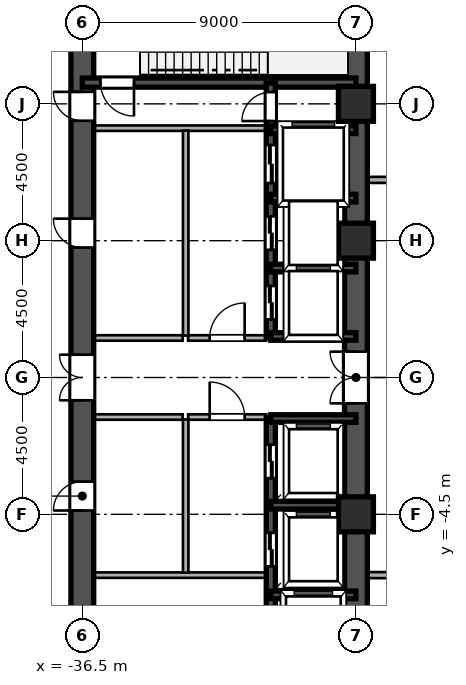
"""IFC4 building model, lengths in metres.
Left out: names, types, materials, properties, quantities, classifications, styles, units other than length and angle.
Written with IfcOpenShell. Run it as: python <this file> out.ifc"""

import sys

from ifc_helpers import new_model, si_unit, direction, frame, frame_2d, origin, origin_2d, place, context, subcontext, project, spatial, rectangle, hollow_rectangle, extrude, source, transform, mapped, element, fill, save


model = new_model("IFC4")
c1 = context("Model", 3, precision=1e-05, world=origin(), true_north=direction((0.0, 1.0)))
c2 = subcontext(c1, "Body", "Model", "MODEL_VIEW")
j1 = project(units=[si_unit("LENGTHUNIT", "METRE"), si_unit("PLANEANGLEUNIT", "RADIAN")], contexts=[c1])
p1 = place(None, origin())
s1 = spatial("IfcSite", under=j1, at=p1, CompositionType="ELEMENT")
p2 = place(p1, origin())
s2 = spatial("IfcBuilding", under=s1, at=p2, CompositionType="ELEMENT")
p3 = place(p2, origin())
s3 = spatial("IfcBuildingStorey", under=s2, at=p3, CompositionType="ELEMENT", Elevation=0.0)
m1 = source(origin(), c2, "Body", "SweptSolid", [
    extrude(hollow_rectangle(XDim=1.15, YDim=1.15, WallThickness=0.048, at=origin_2d()), origin(), (0.0, 0.0, 1.0), 5.4),
])
for number, where, z_axis, x_axis in (
    (1, (-27.5, -4.5, 0.0), (0.0, 0.0, 1.0), (1.0, 0.0, 0.0)),
    (2, (-27.5, 4.5, 0.0), (0.0, 0.0, 1.0), (1.0, 0.0, 0.0)),
    (3, (-27.5, 9.0, 0.0), (0.0, 0.0, 1.0), (1.0, 0.0, 0.0)),
):
    element("IfcColumn", number, at=place(p3, frame(where, z_axis=z_axis, x_axis=x_axis)), inside=s3, PredefinedType="COLUMN", context=c2, shape_type="MappedRepresentation", body=[
        mapped(m1, transform((0.0, 0.0, 0.0), scale=1.0)),
    ])
for number, where, z_axis, x_axis in (
    (4, (-27.5, -13.5, 0.0), (0.0, 0.0, 1.0), (0.0, 1.0, 0.0)),
    (5, (-27.5, 1.3, 0.0), (0.0, 0.0, 1.0), (0.0, 1.0, 0.0)),
):
    element("IfcWall", number, at=place(p3, frame(where, z_axis=z_axis, x_axis=x_axis)), inside=s3, PredefinedType="SHEAR", context=c2, shape_type="SweptSolid", body=[
        extrude(rectangle(XDim=12.2, YDim=0.75, at=frame_2d((6.1, 0.0))), origin(), (0.0, 0.0, 1.0), 5.12),
    ])
p4 = place(p3, frame((-27.5, -1.3, 0.0), z_axis=(0.0, 0.0, 1.0), x_axis=(0.0, 1.0, 0.0)))
e6 = element("IfcWall", 6, at=p4, inside=s3, PredefinedType="SHEAR", context=c2, shape_type="SweptSolid", body=[
    extrude(rectangle(XDim=2.6, YDim=0.75, at=frame_2d((1.3, 0.0))), origin(), (0.0, 0.0, 1.0), 5.12),
])
p5 = place(p4, frame((0.45, 0.0, 0.0)))
e7 = element("IfcOpeningElement", 7, at=p5, cuts=e6, PredefinedType="OPENING", context=c2, shape_type="SweptSolid", body=[
    extrude(rectangle(XDim=1.7, YDim=2.35, at=frame_2d((0.85, 1.175))), frame((0.0, 0.385, 0.0), z_axis=(0.0, -1.0, 0.0), x_axis=(1.0, 0.0, 0.0)), (0.0, 0.0, 1.0), 0.77),
])
p6 = place(p3, frame((-36.5, -13.65, 0.0), z_axis=(0.0, 0.0, 1.0), x_axis=(0.0, 1.0, 0.0)))
e8 = element("IfcWall", 8, at=p6, inside=s3, PredefinedType="SHEAR", context=c2, shape_type="SweptSolid", body=[
    extrude(rectangle(XDim=7.15, YDim=0.75, at=frame_2d((3.575, 0.0))), origin(), (0.0, 0.0, 1.0), 5.12),
])
p7 = place(p6, frame((4.675, 0.0, 0.0)))
e9 = element("IfcOpeningElement", 9, at=p7, cuts=e8, PredefinedType="OPENING", context=c2, shape_type="SweptSolid", body=[
    extrude(rectangle(XDim=1.15, YDim=2.2, at=frame_2d((0.575, 1.1))), frame((0.0, 0.385, 0.0), z_axis=(0.0, -1.0, 0.0), x_axis=(1.0, 0.0, 0.0)), (0.0, 0.0, 1.0), 0.77),
])
p8 = place(p3, frame((-36.5, -1.3, 0.0), z_axis=(0.0, 0.0, 1.0), x_axis=(0.0, 1.0, 0.0)))
e10 = element("IfcWall", 10, at=p8, inside=s3, PredefinedType="SHEAR", context=c2, shape_type="SweptSolid", body=[
    extrude(rectangle(XDim=2.6, YDim=0.75, at=frame_2d((1.3, 0.0))), origin(), (0.0, 0.0, 1.0), 5.12),
])
p9 = place(p8, frame((0.55, 0.0, 0.0)))
e11 = element("IfcOpeningElement", 11, at=p9, cuts=e10, PredefinedType="OPENING", context=c2, shape_type="SweptSolid", body=[
    extrude(rectangle(XDim=1.5, YDim=2.3, at=frame_2d((0.75, 1.15))), frame((0.0, 0.385, 0.0), z_axis=(0.0, -1.0, 0.0), x_axis=(1.0, 0.0, 0.0)), (0.0, 0.0, 1.0), 0.77),
])
p10 = place(p3, frame((-36.5, 8.2, 0.0), z_axis=(0.0, 0.0, 1.0), x_axis=(0.0, 1.0, 0.0)))
e12 = element("IfcWall", 12, at=p10, inside=s3, PredefinedType="SHEAR", context=c2, shape_type="SweptSolid", body=[
    extrude(rectangle(XDim=5.45, YDim=0.75, at=frame_2d((2.725, 0.0))), origin(), (0.0, 0.0, 1.0), 5.12),
])
p11 = place(p10, frame((0.245, 0.0, 0.0)))
e13 = element("IfcOpeningElement", 13, at=p11, cuts=e12, PredefinedType="OPENING", context=c2, shape_type="SweptSolid", body=[
    extrude(rectangle(XDim=0.95, YDim=2.15, at=frame_2d((0.475, 1.075))), frame((0.0, 0.385, 0.0), z_axis=(0.0, -1.0, 0.0), x_axis=(1.0, 0.0, 0.0)), (0.0, 0.0, 1.0), 0.77),
])
p12 = place(p3, frame((-36.5, -6.5, 0.0), z_axis=(0.0, 0.0, 1.0), x_axis=(0.0, 1.0, 0.0)))
e14 = element("IfcWall", 14, at=p12, inside=s3, PredefinedType="SHEAR", context=c2, shape_type="SweptSolid", body=[
    extrude(rectangle(XDim=5.2, YDim=0.75, at=frame_2d((2.6, 0.0))), origin(), (0.0, 0.0, 1.0), 5.12),
])
p13 = place(p12, frame((2.125, 0.0, 0.0)))
e15 = element("IfcOpeningElement", 15, at=p13, cuts=e14, PredefinedType="OPENING", context=c2, shape_type="SweptSolid", body=[
    extrude(rectangle(XDim=0.95, YDim=2.15, at=frame_2d((0.475, 1.075))), frame((0.0, 0.385, 0.0), z_axis=(0.0, -1.0, 0.0), x_axis=(1.0, 0.0, 0.0)), (0.0, 0.0, 1.0), 0.77),
])
p14 = place(p3, frame((-36.5, 1.3, 0.0), z_axis=(0.0, 0.0, 1.0), x_axis=(0.0, 1.0, 0.0)))
e16 = element("IfcWall", 16, at=p14, inside=s3, PredefinedType="SHEAR", context=c2, shape_type="SweptSolid", body=[
    extrude(rectangle(XDim=6.9, YDim=0.75, at=frame_2d((3.45, 0.0))), origin(), (0.0, 0.0, 1.0), 5.12),
])
p15 = place(p14, frame((2.975, 0.0, 0.0)))
e17 = element("IfcOpeningElement", 17, at=p15, cuts=e16, PredefinedType="OPENING", context=c2, shape_type="SweptSolid", body=[
    extrude(rectangle(XDim=0.95, YDim=2.15, at=frame_2d((0.475, 1.075))), frame((0.0, 0.385, 0.0), z_axis=(0.0, -1.0, 0.0), x_axis=(1.0, 0.0, 0.0)), (0.0, 0.0, 1.0), 0.77),
])
p16 = place(p3, frame((-36.5, 9.7, 0.0), z_axis=(0.0, 0.0, 1.0), x_axis=(1.0, 0.0, 0.0)))
e18 = element("IfcWall", 18, at=p16, inside=s3, PredefinedType="SHEAR", context=c2, shape_type="SweptSolid", body=[
    extrude(rectangle(XDim=9.0, YDim=0.3, at=frame_2d((4.5, 0.0))), origin(), (0.0, 0.0, 1.0), 5.12),
])
p17 = place(p16, frame((0.6, 0.0, 0.0)))
e19 = element("IfcOpeningElement", 19, at=p17, cuts=e18, PredefinedType="OPENING", context=c2, shape_type="SweptSolid", body=[
    extrude(rectangle(XDim=1.1, YDim=2.2, at=frame_2d((0.55, 1.1))), frame((0.0, 0.16, 0.0), z_axis=(0.0, -1.0, 0.0), x_axis=(1.0, 0.0, 0.0)), (0.0, 0.0, 1.0), 0.32),
])
for number, where, z_axis, x_axis in (
    (20, (-30.3, -7.15, 0.0), (0.0, 0.0, 1.0), (1.0, 0.0, 0.0)),
    (21, (-30.3, -4.2, 0.0), (0.0, 0.0, 1.0), (1.0, 0.0, 0.0)),
    (22, (-30.3, -1.35, 0.0), (0.0, 0.0, 1.0), (1.0, 0.0, 0.0)),
    (23, (-30.3, 1.35, 0.0), (0.0, 0.0, 1.0), (1.0, 0.0, 0.0)),
    (24, (-30.3, 3.6, 0.0), (0.0, 0.0, 1.0), (1.0, 0.0, 0.0)),
    (25, (-30.3, 5.9, 0.0), (0.0, 0.0, 1.0), (1.0, 0.0, 0.0)),
    (26, (-30.3, 8.15, 0.0), (0.0, 0.0, 1.0), (1.0, 0.0, 0.0)),
):
    element("IfcWall", number, at=place(p3, frame(where, z_axis=z_axis, x_axis=x_axis)), inside=s3, PredefinedType="SHEAR", context=c2, shape_type="SweptSolid", body=[
        extrude(rectangle(XDim=2.8, YDim=0.25, at=frame_2d((1.4, 0.0))), origin(), (0.0, 0.0, 1.0), 5.12),
    ])
p18 = place(p3, frame((-30.3, -9.68, 0.0), z_axis=(0.0, 0.0, 1.0), x_axis=(0.0, 1.0, 0.0)))
e27 = element("IfcWall", 27, at=p18, inside=s3, PredefinedType="SHEAR", context=c2, shape_type="SweptSolid", body=[
    extrude(rectangle(XDim=2.56, YDim=0.3, at=frame_2d((1.28, 0.0))), origin(), (0.0, 0.0, 1.0), 5.12),
])
p19 = place(p18, frame((0.68, 0.0, 0.0)))
e28 = element("IfcOpeningElement", 28, at=p19, cuts=e27, PredefinedType="OPENING", context=c2, shape_type="SweptSolid", body=[
    extrude(rectangle(XDim=1.2, YDim=2.25, at=frame_2d((0.6, 1.125))), frame((0.0, 0.16, 0.0), z_axis=(0.0, -1.0, 0.0), x_axis=(1.0, 0.0, 0.0)), (0.0, 0.0, 1.0), 0.32),
])
p20 = place(p3, frame((-30.3, -7.12, 0.0), z_axis=(0.0, 0.0, 1.0), x_axis=(0.0, 1.0, 0.0)))
e29 = element("IfcWall", 29, at=p20, inside=s3, PredefinedType="SHEAR", context=c2, shape_type="SweptSolid", body=[
    extrude(rectangle(XDim=2.92, YDim=0.3, at=frame_2d((1.46, 0.0))), origin(), (0.0, 0.0, 1.0), 5.12),
])
p21 = place(p20, frame((0.91, 0.0, 0.0)))
e30 = element("IfcOpeningElement", 30, at=p21, cuts=e29, PredefinedType="OPENING", context=c2, shape_type="SweptSolid", body=[
    extrude(rectangle(XDim=1.1, YDim=2.2, at=frame_2d((0.55, 1.1))), frame((0.0, 0.16, 0.0), z_axis=(0.0, -1.0, 0.0), x_axis=(1.0, 0.0, 0.0)), (0.0, 0.0, 1.0), 0.32),
])
p22 = place(p3, frame((-30.3, -4.2, 0.0), z_axis=(0.0, 0.0, 1.0), x_axis=(0.0, 1.0, 0.0)))
e31 = element("IfcWall", 31, at=p22, inside=s3, PredefinedType="SHEAR", context=c2, shape_type="SweptSolid", body=[
    extrude(rectangle(XDim=2.88, YDim=0.3, at=frame_2d((1.44, 0.0))), origin(), (0.0, 0.0, 1.0), 5.12),
])
p23 = place(p22, frame((0.89, 0.0, 0.0)))
e32 = element("IfcOpeningElement", 32, at=p23, cuts=e31, PredefinedType="OPENING", context=c2, shape_type="SweptSolid", body=[
    extrude(rectangle(XDim=1.1, YDim=2.2, at=frame_2d((0.55, 1.1))), frame((0.0, 0.16, 0.0), z_axis=(0.0, -1.0, 0.0), x_axis=(1.0, 0.0, 0.0)), (0.0, 0.0, 1.0), 0.32),
])
p24 = place(p3, frame((-30.3, 1.32, 0.0), z_axis=(0.0, 0.0, 1.0), x_axis=(0.0, 1.0, 0.0)))
e33 = element("IfcWall", 33, at=p24, inside=s3, PredefinedType="SHEAR", context=c2, shape_type="SweptSolid", body=[
    extrude(rectangle(XDim=2.28, YDim=0.3, at=frame_2d((1.14, 0.0))), origin(), (0.0, 0.0, 1.0), 5.12),
])
p25 = place(p24, frame((0.59, 0.0, 0.0)))
e34 = element("IfcOpeningElement", 34, at=p25, cuts=e33, PredefinedType="OPENING", context=c2, shape_type="SweptSolid", body=[
    extrude(rectangle(XDim=1.1, YDim=2.2, at=frame_2d((0.55, 1.1))), frame((0.0, 0.16, 0.0), z_axis=(0.0, -1.0, 0.0), x_axis=(1.0, 0.0, 0.0)), (0.0, 0.0, 1.0), 0.32),
])
p26 = place(p3, frame((-30.3, 3.6, 0.0), z_axis=(0.0, 0.0, 1.0), x_axis=(0.0, 1.0, 0.0)))
e35 = element("IfcWall", 35, at=p26, inside=s3, PredefinedType="SHEAR", context=c2, shape_type="SweptSolid", body=[
    extrude(rectangle(XDim=2.3, YDim=0.3, at=frame_2d((1.15, 0.0))), origin(), (0.0, 0.0, 1.0), 5.12),
])
p27 = place(p26, frame((0.6, 0.0, 0.0)))
e36 = element("IfcOpeningElement", 36, at=p27, cuts=e35, PredefinedType="OPENING", context=c2, shape_type="SweptSolid", body=[
    extrude(rectangle(XDim=1.1, YDim=2.2, at=frame_2d((0.55, 1.1))), frame((0.0, 0.16, 0.0), z_axis=(0.0, -1.0, 0.0), x_axis=(1.0, 0.0, 0.0)), (0.0, 0.0, 1.0), 0.32),
])
p28 = place(p3, frame((-30.3, 5.9, 0.0), z_axis=(0.0, 0.0, 1.0), x_axis=(0.0, 1.0, 0.0)))
e37 = element("IfcWall", 37, at=p28, inside=s3, PredefinedType="SHEAR", context=c2, shape_type="SweptSolid", body=[
    extrude(rectangle(XDim=2.25, YDim=0.3, at=frame_2d((1.125, 0.0))), origin(), (0.0, 0.0, 1.0), 5.12),
])
p29 = place(p28, frame((0.495, 0.0, 0.0)))
e38 = element("IfcOpeningElement", 38, at=p29, cuts=e37, PredefinedType="OPENING", context=c2, shape_type="SweptSolid", body=[
    extrude(rectangle(XDim=1.25, YDim=2.3, at=frame_2d((0.625, 1.15))), frame((0.0, 0.16, 0.0), z_axis=(0.0, -1.0, 0.0), x_axis=(1.0, 0.0, 0.0)), (0.0, 0.0, 1.0), 0.32),
])
p30 = place(p3, frame((-30.3, 8.15, 0.0), z_axis=(0.0, 0.0, 1.0), x_axis=(0.0, 1.0, 0.0)))
e39 = element("IfcWall", 39, at=p30, inside=s3, PredefinedType="SHEAR", context=c2, shape_type="SweptSolid", body=[
    extrude(rectangle(XDim=1.53, YDim=0.3, at=frame_2d((0.765, 0.0))), origin(), (0.0, 0.0, 1.0), 5.12),
])
p31 = place(p30, frame((0.285, 0.0, 0.0)))
e40 = element("IfcOpeningElement", 40, at=p31, cuts=e39, PredefinedType="OPENING", context=c2, shape_type="SweptSolid", body=[
    extrude(rectangle(XDim=0.95, YDim=2.15, at=frame_2d((0.475, 1.075))), frame((0.0, 0.16, 0.0), z_axis=(0.0, -1.0, 0.0), x_axis=(1.0, 0.0, 0.0)), (0.0, 0.0, 1.0), 0.32),
])
for number, where, z_axis, x_axis in (
    (41, (-36.15, -6.5, 0.0), (0.0, 0.0, 1.0), (1.0, 0.0, 0.0)),
    (42, (-36.15, 8.2, 0.0), (0.0, 0.0, 1.0), (1.0, 0.0, 0.0)),
):
    element("IfcWall", number, at=place(p3, frame(where, z_axis=z_axis, x_axis=x_axis)), inside=s3, PredefinedType="PARTITIONING", context=c2, shape_type="SweptSolid", body=[
        extrude(rectangle(XDim=5.7, YDim=0.18, at=frame_2d((2.85, 0.0))), origin(), (0.0, 0.0, 1.0), 5.12),
    ])
p32 = place(p3, frame((-33.1, -6.42, 0.0), z_axis=(0.0, 0.0, 1.0), x_axis=(0.0, 1.0, 0.0)))
e43 = element("IfcWall", 43, at=p32, inside=s3, PredefinedType="PARTITIONING", context=c2, shape_type="SweptSolid", body=[
    extrude(rectangle(XDim=5.04, YDim=0.18, at=frame_2d((2.52, 0.0))), origin(), (0.0, 0.0, 1.0), 5.12),
])
p33 = place(p3, frame((-33.1, 1.38, 0.0), z_axis=(0.0, 0.0, 1.0), x_axis=(0.0, 1.0, 0.0)))
e44 = element("IfcWall", 44, at=p33, inside=s3, PredefinedType="PARTITIONING", context=c2, shape_type="SweptSolid", body=[
    extrude(rectangle(XDim=6.74, YDim=0.18, at=frame_2d((3.37, 0.0))), origin(), (0.0, 0.0, 1.0), 5.12),
])
p34 = place(p3, frame((-33.02, -1.3, 0.0), z_axis=(0.0, 0.0, 1.0), x_axis=(1.0, 0.0, 0.0)))
e45 = element("IfcWall", 45, at=p34, inside=s3, PredefinedType="PARTITIONING", context=c2, shape_type="SweptSolid", body=[
    extrude(rectangle(XDim=2.57, YDim=0.18, at=frame_2d((1.285, 0.0))), origin(), (0.0, 0.0, 1.0), 5.12),
])
p35 = place(p34, frame((0.71, 0.0, 0.0)))
e46 = element("IfcOpeningElement", 46, at=p35, cuts=e45, PredefinedType="OPENING", context=c2, shape_type="SweptSolid", body=[
    extrude(rectangle(XDim=1.15, YDim=2.2, at=frame_2d((0.575, 1.1))), frame((0.0, 0.1, 0.0), z_axis=(0.0, -1.0, 0.0), x_axis=(1.0, 0.0, 0.0)), (0.0, 0.0, 1.0), 0.2),
])
p36 = place(p3, frame((-33.02, 1.3, 0.0), z_axis=(0.0, 0.0, 1.0), x_axis=(1.0, 0.0, 0.0)))
e47 = element("IfcWall", 47, at=p36, inside=s3, PredefinedType="PARTITIONING", context=c2, shape_type="SweptSolid", body=[
    extrude(rectangle(XDim=2.57, YDim=0.18, at=frame_2d((1.285, 0.0))), origin(), (0.0, 0.0, 1.0), 5.12),
])
p37 = place(p36, frame((0.71, 0.0, 0.0)))
e48 = element("IfcOpeningElement", 48, at=p37, cuts=e47, PredefinedType="OPENING", context=c2, shape_type="SweptSolid", body=[
    extrude(rectangle(XDim=1.15, YDim=2.2, at=frame_2d((0.575, 1.1))), frame((0.0, 0.1, 0.0), z_axis=(0.0, -1.0, 0.0), x_axis=(1.0, 0.0, 0.0)), (0.0, 0.0, 1.0), 0.2),
])
for number, where, z_axis, x_axis in (
    (49, (-36.15, -1.3, 0.0), (0.0, 0.0, 1.0), (1.0, 0.0, 0.0)),
    (50, (-36.15, 1.3, 0.0), (0.0, 0.0, 1.0), (1.0, 0.0, 0.0)),
):
    element("IfcWall", number, at=place(p3, frame(where, z_axis=z_axis, x_axis=x_axis)), inside=s3, PredefinedType="PARTITIONING", context=c2, shape_type="SweptSolid", body=[
        extrude(rectangle(XDim=2.95, YDim=0.18, at=frame_2d((1.475, 0.0))), origin(), (0.0, 0.0, 1.0), 5.12),
    ])
p38 = place(p3, frame((-27.12, -6.5, 0.0), z_axis=(0.0, 0.0, 1.0), x_axis=(1.0, 0.0, 0.0)))
e51 = element("IfcWall", 51, at=p38, inside=s3, PredefinedType="PARTITIONING", context=c2, shape_type="SweptSolid", body=[
    extrude(rectangle(XDim=54.24, YDim=0.2, at=frame_2d((27.12, 0.0))), origin(), (0.0, 0.0, 1.0), 5.12),
])
p39 = place(p38, frame((5.145, 0.0, 0.0)))
e52 = element("IfcOpeningElement", 52, at=p39, cuts=e51, PredefinedType="OPENING", context=c2, shape_type="SweptSolid", body=[
    extrude(rectangle(XDim=0.95, YDim=2.15, at=frame_2d((0.475, 1.075))), frame((0.0, 0.11, 0.0), z_axis=(0.0, -1.0, 0.0), x_axis=(1.0, 0.0, 0.0)), (0.0, 0.0, 1.0), 0.22),
])
p40 = place(p38, frame((37.645, 0.0, 0.0)))
e53 = element("IfcOpeningElement", 53, at=p40, cuts=e51, PredefinedType="OPENING", context=c2, shape_type="SweptSolid", body=[
    extrude(rectangle(XDim=0.95, YDim=2.15, at=frame_2d((0.475, 1.075))), frame((0.0, 0.11, 0.0), z_axis=(0.0, -1.0, 0.0), x_axis=(1.0, 0.0, 0.0)), (0.0, 0.0, 1.0), 0.22),
])
p41 = place(p3, frame((-27.12, 6.5, 0.0), z_axis=(0.0, 0.0, 1.0), x_axis=(1.0, 0.0, 0.0)))
e54 = element("IfcWall", 54, at=p41, inside=s3, PredefinedType="PARTITIONING", context=c2, shape_type="SweptSolid", body=[
    extrude(rectangle(XDim=54.24, YDim=0.2, at=frame_2d((27.12, 0.0))), origin(), (0.0, 0.0, 1.0), 5.12),
])
p42 = place(p41, frame((4.045, 0.0, 0.0)))
e55 = element("IfcOpeningElement", 55, at=p42, cuts=e54, PredefinedType="OPENING", context=c2, shape_type="SweptSolid", body=[
    extrude(rectangle(XDim=1.15, YDim=2.2, at=frame_2d((0.575, 1.1))), frame((0.0, 0.11, 0.0), z_axis=(0.0, -1.0, 0.0), x_axis=(1.0, 0.0, 0.0)), (0.0, 0.0, 1.0), 0.22),
])
p43 = place(p41, frame((17.395, 0.0, 0.0)))
e56 = element("IfcOpeningElement", 56, at=p43, cuts=e54, PredefinedType="OPENING", context=c2, shape_type="SweptSolid", body=[
    extrude(rectangle(XDim=0.95, YDim=2.15, at=frame_2d((0.475, 1.075))), frame((0.0, 0.11, 0.0), z_axis=(0.0, -1.0, 0.0), x_axis=(1.0, 0.0, 0.0)), (0.0, 0.0, 1.0), 0.22),
])
p44 = place(p41, frame((47.33, 0.0, 0.0)))
e57 = element("IfcOpeningElement", 57, at=p44, cuts=e54, PredefinedType="OPENING", context=c2, shape_type="SweptSolid", body=[
    extrude(rectangle(XDim=0.88, YDim=2.1, at=frame_2d((0.44, 1.05))), frame((0.0, 0.11, 0.0), z_axis=(0.0, -1.0, 0.0), x_axis=(1.0, 0.0, 0.0)), (0.0, 0.0, 1.0), 0.22),
])
p45 = place(p41, frame((51.68, 0.0, 0.0)))
e58 = element("IfcOpeningElement", 58, at=p45, cuts=e54, PredefinedType="OPENING", context=c2, shape_type="SweptSolid", body=[
    extrude(rectangle(XDim=0.88, YDim=2.1, at=frame_2d((0.44, 1.05))), frame((0.0, 0.11, 0.0), z_axis=(0.0, -1.0, 0.0), x_axis=(1.0, 0.0, 0.0)), (0.0, 0.0, 1.0), 0.22),
])
m2 = source(origin(), c2, "Body", "SweptSolid", [
    extrude(rectangle(XDim=1.7, YDim=2.35, at=frame_2d((0.85, 1.175))), frame((0.0, 0.025, 0.0), z_axis=(0.0, -1.0, 0.0), x_axis=(1.0, 0.0, 0.0)), (0.0, 0.0, 1.0), 0.05),
])
p46 = place(p5, origin())
e59 = element("IfcDoor", 59, at=p46, inside=s3, OperationType="DOUBLE_SWING_LEFT", PredefinedType="DOOR", context=c2, shape_type="MappedRepresentation", body=[
    mapped(m2, transform((0.0, 0.0, 0.0), scale=1.0)),
])
fill(e7, e59)
m3 = source(origin(), c2, "Body", "SweptSolid", [
    extrude(rectangle(XDim=1.5, YDim=2.3, at=frame_2d((0.75, 1.15))), frame((0.0, 0.025, 0.0), z_axis=(0.0, -1.0, 0.0), x_axis=(1.0, 0.0, 0.0)), (0.0, 0.0, 1.0), 0.05),
])
p47 = place(p9, origin())
e60 = element("IfcDoor", 60, at=p47, inside=s3, OperationType="DOUBLE_SWING_LEFT", PredefinedType="DOOR", context=c2, shape_type="MappedRepresentation", body=[
    mapped(m3, transform((0.0, 0.0, 0.0), scale=1.0)),
])
fill(e11, e60)
m4 = source(origin(), c2, "Body", "SweptSolid", [
    extrude(rectangle(XDim=0.95, YDim=2.15, at=frame_2d((0.475, 1.075))), frame((0.0, 0.025, 0.0), z_axis=(0.0, -1.0, 0.0), x_axis=(1.0, 0.0, 0.0)), (0.0, 0.0, 1.0), 0.05),
])
p48 = place(p11, origin())
e61 = element("IfcDoor", 61, at=p48, inside=s3, OperationType="SINGLE_SWING_RIGHT", PredefinedType="DOOR", context=c2, shape_type="MappedRepresentation", body=[
    mapped(m4, transform((0.0, 0.0, 0.0), scale=1.0)),
])
fill(e13, e61)
p49 = place(p13, origin())
e62 = element("IfcDoor", 62, at=p49, inside=s3, OperationType="SINGLE_SWING_LEFT", PredefinedType="DOOR", context=c2, shape_type="MappedRepresentation", body=[
    mapped(m4, transform((0.0, 0.0, 0.0), scale=1.0)),
])
fill(e15, e62)
p50 = place(p15, origin())
e63 = element("IfcDoor", 63, at=p50, inside=s3, OperationType="SINGLE_SWING_RIGHT", PredefinedType="DOOR", context=c2, shape_type="MappedRepresentation", body=[
    mapped(m4, transform((0.0, 0.0, 0.0), scale=1.0)),
])
fill(e17, e63)
m5 = source(origin(), c2, "Body", "SweptSolid", [
    extrude(rectangle(XDim=1.1, YDim=2.2, at=frame_2d((0.55, 1.1))), frame((0.0, 0.025, 0.0), z_axis=(0.0, -1.0, 0.0), x_axis=(1.0, 0.0, 0.0)), (0.0, 0.0, 1.0), 0.05),
])
p51 = place(p17, frame((1.1, 0.0, 0.0), z_axis=(0.0, 0.0, 1.0), x_axis=(-1.0, 0.0, 0.0)))
e64 = element("IfcDoor", 64, at=p51, inside=s3, OperationType="SINGLE_SWING_RIGHT", PredefinedType="DOOR", context=c2, shape_type="MappedRepresentation", body=[
    mapped(m5, transform((0.0, 0.0, 0.0), scale=1.0)),
])
fill(e19, e64)
m6 = source(origin(), c2, "Body", "SweptSolid", [
    extrude(rectangle(XDim=1.1, YDim=2.2, at=frame_2d((0.55, 1.1))), frame((0.0, 0.025, 0.0), z_axis=(0.0, -1.0, 0.0), x_axis=(1.0, 0.0, 0.0)), (0.0, 0.0, 1.0), 0.05),
])
p52 = place(p21, origin())
e65 = element("IfcDoor", 65, at=p52, inside=s3, OperationType="DOUBLE_DOOR_SLIDING", PredefinedType="DOOR", context=c2, shape_type="MappedRepresentation", body=[
    mapped(m6, transform((0.0, 0.0, 0.0), scale=1.0)),
])
fill(e30, e65)
p53 = place(p23, origin())
e66 = element("IfcDoor", 66, at=p53, inside=s3, OperationType="DOUBLE_DOOR_SLIDING", PredefinedType="DOOR", context=c2, shape_type="MappedRepresentation", body=[
    mapped(m6, transform((0.0, 0.0, 0.0), scale=1.0)),
])
fill(e32, e66)
p54 = place(p25, origin())
e67 = element("IfcDoor", 67, at=p54, inside=s3, OperationType="DOUBLE_DOOR_SLIDING", PredefinedType="DOOR", context=c2, shape_type="MappedRepresentation", body=[
    mapped(m6, transform((0.0, 0.0, 0.0), scale=1.0)),
])
fill(e34, e67)
p55 = place(p27, origin())
e68 = element("IfcDoor", 68, at=p55, inside=s3, OperationType="DOUBLE_DOOR_SLIDING", PredefinedType="DOOR", context=c2, shape_type="MappedRepresentation", body=[
    mapped(m6, transform((0.0, 0.0, 0.0), scale=1.0)),
])
fill(e36, e68)
m7 = source(origin(), c2, "Body", "SweptSolid", [
    extrude(rectangle(XDim=1.25, YDim=2.3, at=frame_2d((0.625, 1.15))), frame((0.0, 0.025, 0.0), z_axis=(0.0, -1.0, 0.0), x_axis=(1.0, 0.0, 0.0)), (0.0, 0.0, 1.0), 0.05),
])
p56 = place(p29, origin())
e69 = element("IfcDoor", 69, at=p56, inside=s3, OperationType="DOUBLE_DOOR_SLIDING", PredefinedType="DOOR", context=c2, shape_type="MappedRepresentation", body=[
    mapped(m7, transform((0.0, 0.0, 0.0), scale=1.0)),
])
fill(e38, e69)
p57 = place(p31, origin())
e70 = element("IfcDoor", 70, at=p57, inside=s3, OperationType="SINGLE_SWING_LEFT", PredefinedType="DOOR", context=c2, shape_type="MappedRepresentation", body=[
    mapped(m4, transform((0.0, 0.0, 0.0), scale=1.0)),
])
fill(e40, e70)
m8 = source(origin(), c2, "Body", "SweptSolid", [
    extrude(rectangle(XDim=1.15, YDim=2.2, at=frame_2d((0.575, 1.1))), frame((0.0, 0.025, 0.0), z_axis=(0.0, -1.0, 0.0), x_axis=(1.0, 0.0, 0.0)), (0.0, 0.0, 1.0), 0.05),
])
p58 = place(p35, origin())
e71 = element("IfcDoor", 71, at=p58, inside=s3, OperationType="SINGLE_SWING_LEFT", PredefinedType="DOOR", context=c2, shape_type="MappedRepresentation", body=[
    mapped(m8, transform((0.0, 0.0, 0.0), scale=1.0)),
])
fill(e46, e71)
p59 = place(p37, origin())
e72 = element("IfcDoor", 72, at=p59, inside=s3, OperationType="SINGLE_SWING_RIGHT", PredefinedType="DOOR", context=c2, shape_type="MappedRepresentation", body=[
    mapped(m8, transform((0.0, 0.0, 0.0), scale=1.0)),
])
fill(e48, e72)
save(model, sys.argv[1])
